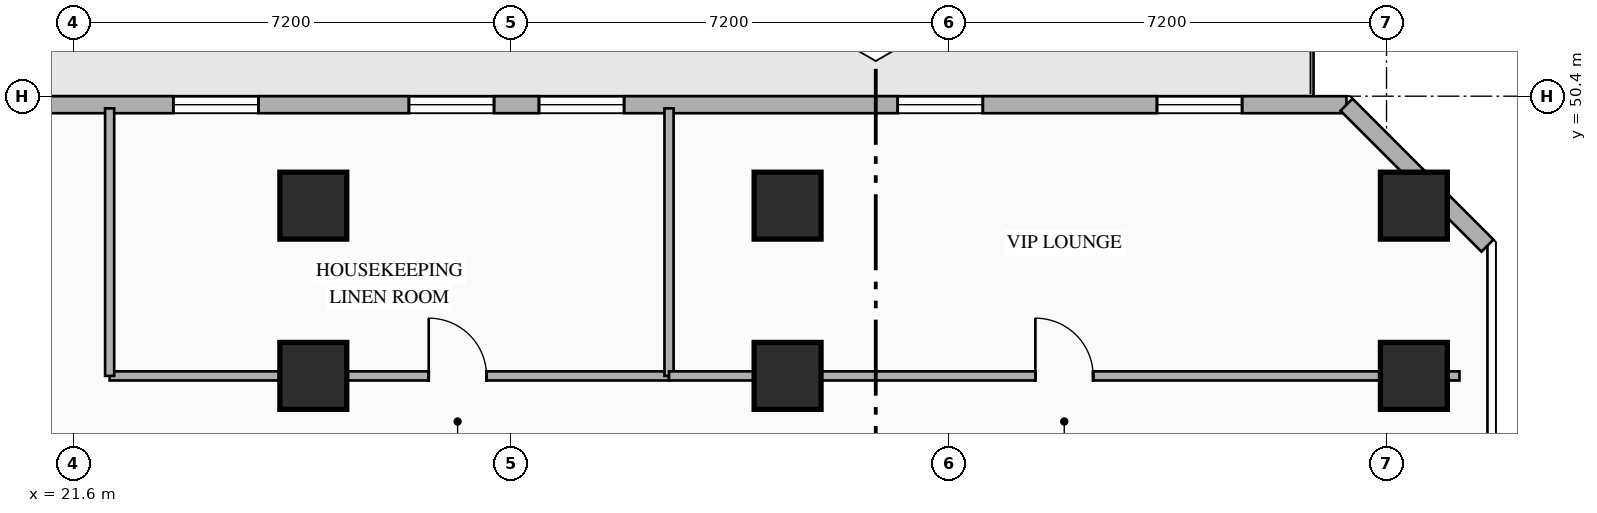
"""IFC4 building model, lengths in metres.
Left out: names, types, materials, properties, quantities, classifications, styles, units other than length and angle.
Written with IfcOpenShell. Run it as: python <this file> out.ifc"""

import sys

from ifc_helpers import new_model, si_unit, direction, frame, frame_2d, origin, origin_2d, place, context, subcontext, project, spatial, rectangle, hollow_rectangle, extrude, element, fill, save


model = new_model("IFC4")
c1 = context("Model", 3, precision=1e-05, world=origin(), true_north=direction((0.0, 1.0)))
c2 = subcontext(c1, "Body", "Model", "MODEL_VIEW")
j1 = project(units=[si_unit("LENGTHUNIT", "METRE"), si_unit("PLANEANGLEUNIT", "RADIAN")], contexts=[c1])
p1 = place(None, origin())
s1 = spatial("IfcSite", under=j1, at=p1, CompositionType="ELEMENT")
p2 = place(p1, origin())
s2 = spatial("IfcBuilding", under=s1, at=p2, CompositionType="ELEMENT")
p3 = place(p2, frame((0.0, 0.0, 56.7)))
s3 = spatial("IfcBuildingStorey", under=s2, at=p3, CompositionType="ELEMENT", Elevation=56.7)
for number, where, z_axis, x_axis in (
    (1, (25.55, 45.8, 0.0), (0.0, 0.0, 1.0), (1.0, 0.0, 0.0)),
    (2, (33.35, 45.8, 0.0), (0.0, 0.0, 1.0), (1.0, 0.0, 0.0)),
    (3, (43.65, 45.8, 0.0), (0.0, 0.0, 1.0), (1.0, 0.0, 0.0)),
    (4, (25.55, 48.6, 0.0), (0.0, 0.0, 1.0), (1.0, 0.0, 0.0)),
    (5, (33.35, 48.6, 0.0), (0.0, 0.0, 1.0), (1.0, 0.0, 0.0)),
    (6, (43.65, 48.6, 0.0), (0.0, 0.0, 1.0), (1.0, 0.0, 0.0)),
):
    element("IfcColumn", number, at=place(p3, frame(where, z_axis=z_axis, x_axis=x_axis)), inside=s3, PredefinedType="COLUMN", context=c2, shape_type="SweptSolid", body=[
        extrude(hollow_rectangle(XDim=1.1, YDim=1.1, WallThickness=0.04, at=origin_2d()), origin(), (0.0, 0.0, 1.0), 3.35),
    ])
p4 = place(p3, frame((2.458, 50.26, 0.0), z_axis=(0.0, 0.0, 1.0), x_axis=(1.0, 0.0, 0.0)))
e7 = element("IfcWall", 7, at=p4, inside=s3, PredefinedType="STANDARD", context=c2, shape_type="SweptSolid", body=[
    extrude(rectangle(XDim=40.084, YDim=0.28, at=frame_2d((20.042, 0.0))), origin(), (0.0, 0.0, 1.0), 3.13),
])
p5 = place(p4, frame((4.26, 0.0, 0.0)))
e8 = element("IfcOpeningElement", 8, at=p5, cuts=e7, PredefinedType="OPENING", context=c2, shape_type="SweptSolid", body=[
    extrude(rectangle(XDim=1.1, YDim=2.2, at=frame_2d((0.55, 1.1))), frame((0.0, 0.15, 0.0), z_axis=(0.0, -1.0, 0.0), x_axis=(1.0, 0.0, 0.0)), (0.0, 0.0, 1.0), 0.3),
])
p6 = place(p4, frame((0.46, 0.0, 0.85)))
e9 = element("IfcOpeningElement", 9, at=p6, cuts=e7, PredefinedType="OPENING", context=c2, shape_type="SweptSolid", body=[
    extrude(rectangle(XDim=1.4, YDim=1.8, at=frame_2d((0.7, 0.9))), frame((0.0, 0.15, 0.0), z_axis=(0.0, -1.0, 0.0), x_axis=(1.0, 0.0, 0.0)), (0.0, 0.0, 1.0), 0.3),
])
p7 = place(p4, frame((10.0, 0.0, 0.85)))
e10 = element("IfcOpeningElement", 10, at=p7, cuts=e7, PredefinedType="OPENING", context=c2, shape_type="SweptSolid", body=[
    extrude(rectangle(XDim=1.4, YDim=1.8, at=frame_2d((0.7, 0.9))), frame((0.0, 0.15, 0.0), z_axis=(0.0, -1.0, 0.0), x_axis=(1.0, 0.0, 0.0)), (0.0, 0.0, 1.0), 0.3),
])
p8 = place(p4, frame((14.02, 0.0, 0.85)))
e11 = element("IfcOpeningElement", 11, at=p8, cuts=e7, PredefinedType="OPENING", context=c2, shape_type="SweptSolid", body=[
    extrude(rectangle(XDim=1.4, YDim=1.8, at=frame_2d((0.7, 0.9))), frame((0.0, 0.15, 0.0), z_axis=(0.0, -1.0, 0.0), x_axis=(1.0, 0.0, 0.0)), (0.0, 0.0, 1.0), 0.3),
])
p9 = place(p4, frame((20.789, 0.0, 0.85)))
e12 = element("IfcOpeningElement", 12, at=p9, cuts=e7, PredefinedType="OPENING", context=c2, shape_type="SweptSolid", body=[
    extrude(rectangle(XDim=1.4, YDim=1.8, at=frame_2d((0.7, 0.9))), frame((0.0, 0.15, 0.0), z_axis=(0.0, -1.0, 0.0), x_axis=(1.0, 0.0, 0.0)), (0.0, 0.0, 1.0), 0.3),
])
p10 = place(p4, frame((24.664, 0.0, 0.85)))
e13 = element("IfcOpeningElement", 13, at=p10, cuts=e7, PredefinedType="OPENING", context=c2, shape_type="SweptSolid", body=[
    extrude(rectangle(XDim=1.4, YDim=1.8, at=frame_2d((0.7, 0.9))), frame((0.0, 0.15, 0.0), z_axis=(0.0, -1.0, 0.0), x_axis=(1.0, 0.0, 0.0)), (0.0, 0.0, 1.0), 0.3),
])
p11 = place(p4, frame((26.803, 0.0, 0.85)))
e14 = element("IfcOpeningElement", 14, at=p11, cuts=e7, PredefinedType="OPENING", context=c2, shape_type="SweptSolid", body=[
    extrude(rectangle(XDim=1.4, YDim=1.8, at=frame_2d((0.7, 0.9))), frame((0.0, 0.15, 0.0), z_axis=(0.0, -1.0, 0.0), x_axis=(1.0, 0.0, 0.0)), (0.0, 0.0, 1.0), 0.3),
])
p12 = place(p4, frame((32.703, 0.0, 0.85)))
e15 = element("IfcOpeningElement", 15, at=p12, cuts=e7, PredefinedType="OPENING", context=c2, shape_type="SweptSolid", body=[
    extrude(rectangle(XDim=1.4, YDim=1.8, at=frame_2d((0.7, 0.9))), frame((0.0, 0.15, 0.0), z_axis=(0.0, -1.0, 0.0), x_axis=(1.0, 0.0, 0.0)), (0.0, 0.0, 1.0), 0.3),
])
p13 = place(p4, frame((36.967, 0.0, 0.85)))
e16 = element("IfcOpeningElement", 16, at=p13, cuts=e7, PredefinedType="OPENING", context=c2, shape_type="SweptSolid", body=[
    extrude(rectangle(XDim=1.4, YDim=1.8, at=frame_2d((0.7, 0.9))), frame((0.0, 0.15, 0.0), z_axis=(0.0, -1.0, 0.0), x_axis=(1.0, 0.0, 0.0)), (0.0, 0.0, 1.0), 0.3),
])
p14 = place(p3, frame((42.542, 50.26, 0.0), z_axis=(0.0, 0.0, 1.0), x_axis=(0.707106781187, -0.707106781187, 0.0)))
e17 = element("IfcWall", 17, at=p14, inside=s3, PredefinedType="STANDARD", context=c2, shape_type="SweptSolid", body=[
    extrude(rectangle(XDim=3.278, YDim=0.28, at=frame_2d((1.639, 0.0))), origin(), (0.0, 0.0, 1.0), 3.13),
])
p15 = place(p3, frame((22.2, 45.8, 0.0), z_axis=(0.0, 0.0, 1.0), x_axis=(1.0, 0.0, 0.0)))
e18 = element("IfcWall", 18, at=p15, inside=s3, PredefinedType="PARTITIONING", context=c2, shape_type="SweptSolid", body=[
    extrude(rectangle(XDim=9.2, YDim=0.15, at=frame_2d((4.6, 0.0))), origin(), (0.0, 0.0, 1.0), 2.425),
])
p16 = place(p15, frame((5.248, 0.0, 0.0)))
e19 = element("IfcOpeningElement", 19, at=p16, cuts=e18, PredefinedType="OPENING", context=c2, shape_type="SweptSolid", body=[
    extrude(rectangle(XDim=0.95, YDim=2.15, at=frame_2d((0.475, 1.075))), frame((0.0, 0.085, 0.0), z_axis=(0.0, -1.0, 0.0), x_axis=(1.0, 0.0, 0.0)), (0.0, 0.0, 1.0), 0.17),
])
for number, where, z_axis, x_axis in (
    (20, (22.2, 45.8, 0.0), (0.0, 0.0, 1.0), (0.0, 1.0, 0.0)),
    (21, (31.4, 45.8, 0.0), (0.0, 0.0, 1.0), (0.0, 1.0, 0.0)),
):
    element("IfcWall", number, at=place(p3, frame(where, z_axis=z_axis, x_axis=x_axis)), inside=s3, PredefinedType="PARTITIONING", context=c2, shape_type="SweptSolid", body=[
        extrude(rectangle(XDim=4.4, YDim=0.15, at=frame_2d((2.2, 0.0))), origin(), (0.0, 0.0, 1.0), 3.13),
    ])
p17 = place(p3, frame((31.4, 45.8, 0.0), z_axis=(0.0, 0.0, 1.0), x_axis=(1.0, 0.0, 0.0)))
e22 = element("IfcWall", 22, at=p17, inside=s3, PredefinedType="PARTITIONING", context=c2, shape_type="SweptSolid", body=[
    extrude(rectangle(XDim=13.0, YDim=0.15, at=frame_2d((6.5, 0.0))), origin(), (0.0, 0.0, 1.0), 2.425),
])
p18 = place(p17, frame((6.025, 0.0, 0.0)))
e23 = element("IfcOpeningElement", 23, at=p18, cuts=e22, PredefinedType="OPENING", context=c2, shape_type="SweptSolid", body=[
    extrude(rectangle(XDim=0.95, YDim=2.15, at=frame_2d((0.475, 1.075))), frame((0.0, 0.085, 0.0), z_axis=(0.0, -1.0, 0.0), x_axis=(1.0, 0.0, 0.0)), (0.0, 0.0, 1.0), 0.17),
])
p19 = place(p9, origin())
e24 = element("IfcWindow", 24, at=p19, inside=s3, PartitioningType="SINGLE_PANEL", PredefinedType="WINDOW", context=c2, shape_type="SweptSolid", body=[
    extrude(rectangle(XDim=1.4, YDim=1.8, at=frame_2d((0.7, 0.9))), frame((0.0, 0.03, 0.0), z_axis=(0.0, -1.0, 0.0), x_axis=(1.0, 0.0, 0.0)), (0.0, 0.0, 1.0), 0.06),
])
fill(e12, e24)
p20 = place(p10, origin())
e25 = element("IfcWindow", 25, at=p20, inside=s3, PartitioningType="SINGLE_PANEL", PredefinedType="WINDOW", context=c2, shape_type="SweptSolid", body=[
    extrude(rectangle(XDim=1.4, YDim=1.8, at=frame_2d((0.7, 0.9))), frame((0.0, 0.03, 0.0), z_axis=(0.0, -1.0, 0.0), x_axis=(1.0, 0.0, 0.0)), (0.0, 0.0, 1.0), 0.06),
])
fill(e13, e25)
p21 = place(p11, origin())
e26 = element("IfcWindow", 26, at=p21, inside=s3, PartitioningType="SINGLE_PANEL", PredefinedType="WINDOW", context=c2, shape_type="SweptSolid", body=[
    extrude(rectangle(XDim=1.4, YDim=1.8, at=frame_2d((0.7, 0.9))), frame((0.0, 0.03, 0.0), z_axis=(0.0, -1.0, 0.0), x_axis=(1.0, 0.0, 0.0)), (0.0, 0.0, 1.0), 0.06),
])
fill(e14, e26)
p22 = place(p12, origin())
e27 = element("IfcWindow", 27, at=p22, inside=s3, PartitioningType="SINGLE_PANEL", PredefinedType="WINDOW", context=c2, shape_type="SweptSolid", body=[
    extrude(rectangle(XDim=1.4, YDim=1.8, at=frame_2d((0.7, 0.9))), frame((0.0, 0.03, 0.0), z_axis=(0.0, -1.0, 0.0), x_axis=(1.0, 0.0, 0.0)), (0.0, 0.0, 1.0), 0.06),
])
fill(e15, e27)
p23 = place(p13, origin())
e28 = element("IfcWindow", 28, at=p23, inside=s3, PartitioningType="SINGLE_PANEL", PredefinedType="WINDOW", context=c2, shape_type="SweptSolid", body=[
    extrude(rectangle(XDim=1.4, YDim=1.8, at=frame_2d((0.7, 0.9))), frame((0.0, 0.03, 0.0), z_axis=(0.0, -1.0, 0.0), x_axis=(1.0, 0.0, 0.0)), (0.0, 0.0, 1.0), 0.06),
])
fill(e16, e28)
p24 = place(p16, origin())
e29 = element("IfcDoor", 29, at=p24, inside=s3, OperationType="SINGLE_SWING_LEFT", PredefinedType="DOOR", context=c2, shape_type="SweptSolid", body=[
    extrude(rectangle(XDim=0.95, YDim=2.15, at=frame_2d((0.475, 1.075))), frame((0.0, 0.025, 0.0), z_axis=(0.0, -1.0, 0.0), x_axis=(1.0, 0.0, 0.0)), (0.0, 0.0, 1.0), 0.05),
])
fill(e19, e29)
p25 = place(p18, origin())
e30 = element("IfcDoor", 30, at=p25, inside=s3, OperationType="SINGLE_SWING_LEFT", PredefinedType="DOOR", context=c2, shape_type="SweptSolid", body=[
    extrude(rectangle(XDim=0.95, YDim=2.15, at=frame_2d((0.475, 1.075))), frame((0.0, 0.025, 0.0), z_axis=(0.0, -1.0, 0.0), x_axis=(1.0, 0.0, 0.0)), (0.0, 0.0, 1.0), 0.05),
])
fill(e23, e30)
save(model, sys.argv[1])
